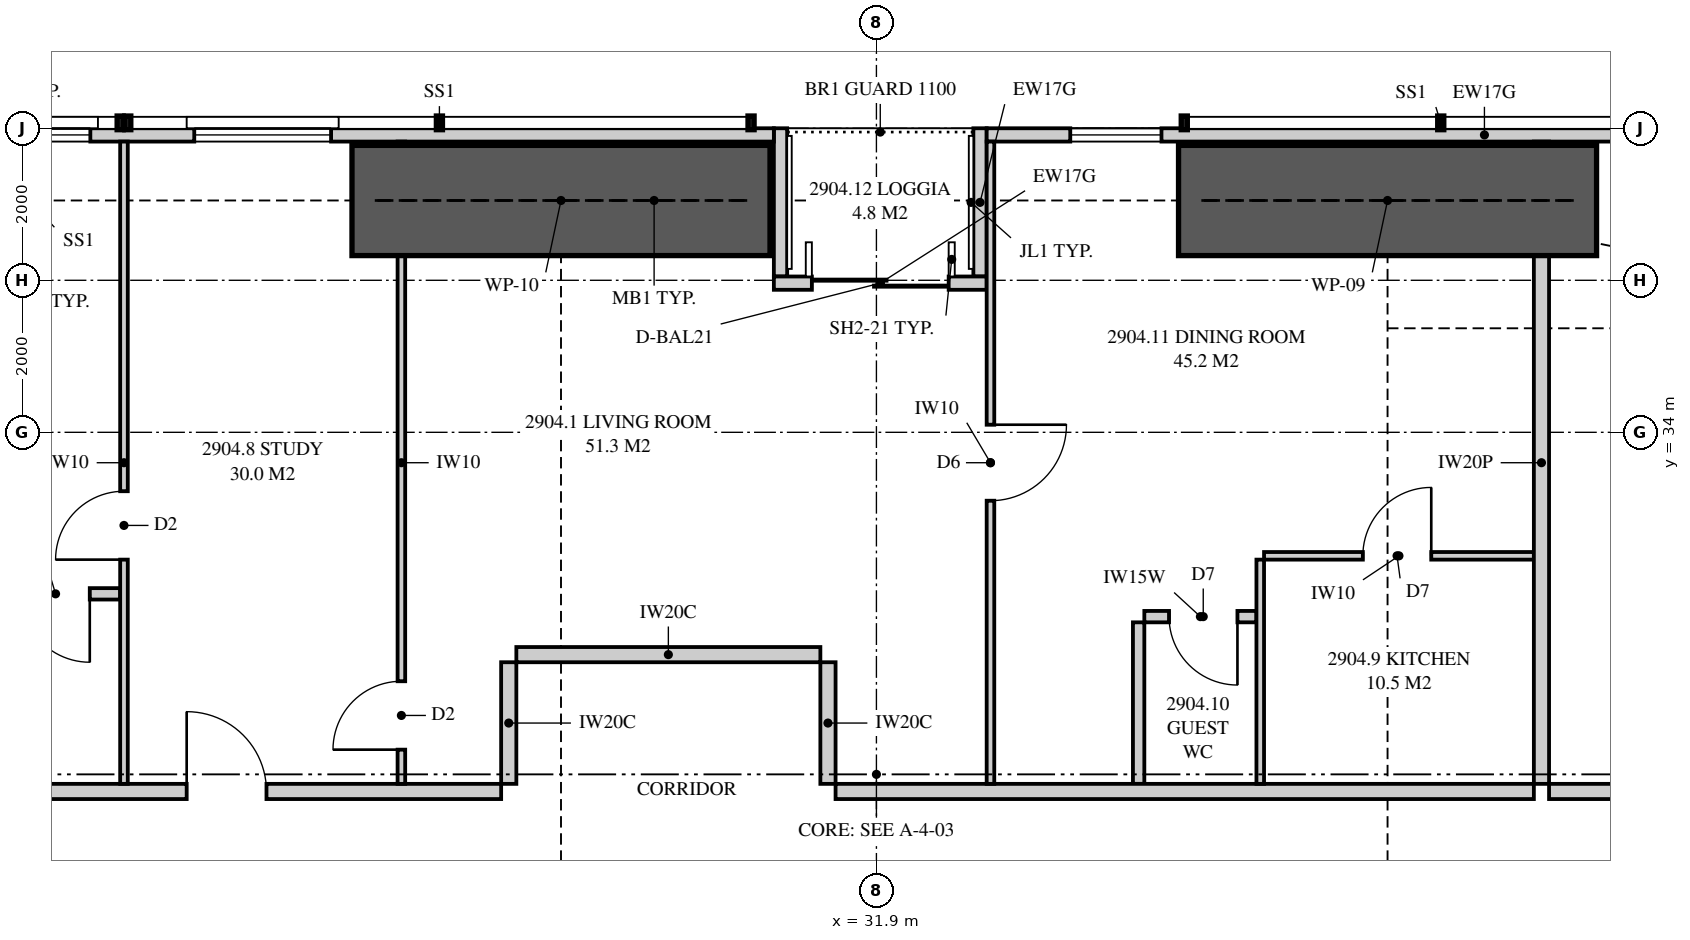
"""IFC4 building model, lengths in metres.
Left out: names, types, materials, properties, quantities, classifications, styles, units other than length and angle.
Written with IfcOpenShell. Run it as: python <this file> out.ifc"""

import sys

from ifc_helpers import new_model, si_unit, direction, frame, frame_2d, origin, place, context, subcontext, project, spatial, polyline, rectangle, outline, extrude, element, fill, save


model = new_model("IFC4")
c1 = context("Model", 3, precision=1e-05, world=origin(), true_north=direction((0.0, 1.0)))
c2 = subcontext(c1, "Body", "Model", "MODEL_VIEW")
j1 = project(units=[si_unit("LENGTHUNIT", "METRE"), si_unit("PLANEANGLEUNIT", "RADIAN")], contexts=[c1])
p1 = place(None, origin())
s1 = spatial("IfcSite", under=j1, at=p1, CompositionType="ELEMENT")
p2 = place(p1, origin())
s2 = spatial("IfcBuilding", under=s1, at=p2, CompositionType="ELEMENT")
p3 = place(p2, frame((0.0, 0.0, 108.2)))
s3 = spatial("IfcBuildingStorey", under=s2, at=p3, CompositionType="ELEMENT", Elevation=108.2)
p4 = place(p3, frame((46.449, 37.913, 0.0), z_axis=(0.0, 0.0, 1.0), x_axis=(-1.0, 0.0, 0.0)))
e1 = element("IfcWall", 1, at=p4, inside=s3, PredefinedType="SOLIDWALL", context=c2, shape_type="SweptSolid", body=[
    extrude(outline(polyline([(0.0, 0.0), (13.098, 0.0), (13.098, 2.15), (7.824, 2.15), (7.824, 3.11), (7.666, 3.11), (7.666, 2.15), (7.62, 2.15), (7.62, 3.11), (0.0, 3.11), (0.0, 0.0)])), frame((0.0, 0.087, 0.0), z_axis=(0.0, -1.0, 0.0), x_axis=(1.0, 0.0, 0.0)), (0.0, 0.0, 1.0), 0.175),
])
p5 = place(p4, frame((2.25, 0.0, 0.4)))
e2 = element("IfcOpeningElement", 2, at=p5, cuts=e1, PredefinedType="OPENING", context=c2, shape_type="SweptSolid", body=[
    extrude(rectangle(XDim=1.2, YDim=1.7, at=frame_2d((0.6, 0.85))), frame((0.0, 0.097, 0.0), z_axis=(0.0, -1.0, 0.0), x_axis=(1.0, 0.0, 0.0)), (0.0, 0.0, 1.0), 0.195),
])
p6 = place(p4, frame((10.798, 0.0, 0.4)))
e3 = element("IfcOpeningElement", 3, at=p6, cuts=e1, PredefinedType="OPENING", context=c2, shape_type="SweptSolid", body=[
    extrude(rectangle(XDim=1.2, YDim=1.7, at=frame_2d((0.6, 0.85))), frame((0.0, 0.097, 0.0), z_axis=(0.0, -1.0, 0.0), x_axis=(1.0, 0.0, 0.0)), (0.0, 0.0, 1.0), 0.195),
])
p7 = place(p3, frame((30.551, 37.913, 0.0), z_axis=(0.0, 0.0, 1.0), x_axis=(-1.0, 0.0, 0.0)))
e4 = element("IfcWall", 4, at=p7, inside=s3, PredefinedType="SOLIDWALL", context=c2, shape_type="SweptSolid", body=[
    extrude(outline(polyline([(0.0, 0.0), (21.499, 0.0), (21.499, 3.11), (13.879, 3.11), (13.879, 2.15), (13.834, 2.15), (13.834, 3.11), (13.676, 3.11), (13.676, 2.15), (0.0, 2.15), (0.0, 0.0)])), frame((0.0, 0.087, 0.0), z_axis=(0.0, -1.0, 0.0), x_axis=(1.0, 0.0, 0.0)), (0.0, 0.0, 1.0), 0.175),
])
p8 = place(p7, frame((5.826, 0.0, 0.4)))
e5 = element("IfcOpeningElement", 5, at=p8, cuts=e4, PredefinedType="OPENING", context=c2, shape_type="SweptSolid", body=[
    extrude(rectangle(XDim=1.8, YDim=1.7, at=frame_2d((0.9, 0.85))), frame((0.0, 0.097, 0.0), z_axis=(0.0, -1.0, 0.0), x_axis=(1.0, 0.0, 0.0)), (0.0, 0.0, 1.0), 0.195),
])
p9 = place(p7, frame((8.993, 0.0, 0.4)))
e6 = element("IfcOpeningElement", 6, at=p9, cuts=e4, PredefinedType="OPENING", context=c2, shape_type="SweptSolid", body=[
    extrude(rectangle(XDim=1.8, YDim=1.7, at=frame_2d((0.9, 0.85))), frame((0.0, 0.097, 0.0), z_axis=(0.0, -1.0, 0.0), x_axis=(1.0, 0.0, 0.0)), (0.0, 0.0, 1.0), 0.195),
])
p10 = place(p7, frame((16.566, 0.0, 0.4)))
e7 = element("IfcOpeningElement", 7, at=p10, cuts=e4, PredefinedType="OPENING", context=c2, shape_type="SweptSolid", body=[
    extrude(rectangle(XDim=1.8, YDim=1.7, at=frame_2d((0.9, 0.85))), frame((0.0, 0.097, 0.0), z_axis=(0.0, -1.0, 0.0), x_axis=(1.0, 0.0, 0.0)), (0.0, 0.0, 1.0), 0.195),
])
p11 = place(p3, frame((33.351, 35.962, 0.0), z_axis=(0.0, 0.0, 1.0), x_axis=(-1.0, 0.0, 0.0)))
e8 = element("IfcWall", 8, at=p11, inside=s3, PredefinedType="SOLIDWALL", context=c2, shape_type="SweptSolid", body=[
    extrude(rectangle(XDim=2.8, YDim=0.175, at=frame_2d((1.4, 0.0))), origin(), (0.0, 0.0, 1.0), 3.11),
])
p12 = place(p11, frame((0.5, 0.0, 0.0)))
e9 = element("IfcOpeningElement", 9, at=p12, cuts=e8, PredefinedType="OPENING", context=c2, shape_type="SweptSolid", body=[
    extrude(rectangle(XDim=1.8, YDim=2.1, at=frame_2d((0.9, 1.05))), frame((0.0, 0.097, 0.0), z_axis=(0.0, -1.0, 0.0), x_axis=(1.0, 0.0, 0.0)), (0.0, 0.0, 1.0), 0.195),
])
for number, where, z_axis, x_axis in (
    (10, (33.263, 38.0, 0.0), (0.0, 0.0, 1.0), (0.0, -1.0, 0.0)),
    (11, (30.638, 38.0, 0.0), (0.0, 0.0, 1.0), (0.0, -1.0, 0.0)),
):
    element("IfcWall", number, at=place(p3, frame(where, z_axis=z_axis, x_axis=x_axis)), inside=s3, PredefinedType="SOLIDWALL", context=c2, shape_type="SweptSolid", body=[
        extrude(outline(polyline([(0.0, 0.0), (1.95, 0.0), (1.95, 3.11), (1.75, 3.11), (1.75, 2.15), (0.15, 2.15), (0.15, 3.11), (0.0, 3.11), (0.0, 0.0)])), frame((0.0, 0.087, 0.0), z_axis=(0.0, -1.0, 0.0), x_axis=(1.0, 0.0, 0.0)), (0.0, 0.0, 1.0), 0.175),
    ])
p13 = place(p3, frame((40.65, 37.825, 0.0), z_axis=(0.0, 0.0, 1.0), x_axis=(0.0, -1.0, 0.0)))
e12 = element("IfcWall", 12, at=p13, inside=s3, PredefinedType="PARTITIONING", context=c2, shape_type="SweptSolid", body=[
    extrude(outline(polyline([(0.259, 3.11), (0.0, 3.11), (0.0, 0.0), (0.529, 0.0), (0.529, 0.12), (1.021, 0.12), (1.021, 0.0), (8.45, 0.0), (8.45, 3.11), (3.766, 3.11), (3.766, 2.51), (2.117, 2.51), (2.117, 2.15), (1.021, 2.15), (1.021, 2.03), (0.529, 2.03), (0.529, 2.15), (0.259, 2.15), (0.259, 3.11)])), frame((0.0, 0.1, 0.0), z_axis=(0.0, -1.0, 0.0), x_axis=(1.0, 0.0, 0.0)), (0.0, 0.0, 1.0), 0.2),
])
p14 = place(p3, frame((17.775, 29.275, 0.0), z_axis=(0.0, 0.0, 1.0), x_axis=(1.0, 0.0, 0.0)))
e13 = element("IfcWall", 13, at=p14, inside=s3, PredefinedType="PARTITIONING", context=c2, shape_type="SweptSolid", body=[
    extrude(rectangle(XDim=9.188, YDim=0.2, at=frame_2d((4.594, 0.0))), origin(), (0.0, 0.0, 1.0), 3.11),
])
p15 = place(p14, frame((5.05, 0.0, 0.0)))
e14 = element("IfcOpeningElement", 14, at=p15, cuts=e13, PredefinedType="OPENING", context=c2, shape_type="SweptSolid", body=[
    extrude(rectangle(XDim=1.05, YDim=2.2, at=frame_2d((0.525, 1.1))), frame((0.0, 0.11, 0.0), z_axis=(0.0, -1.0, 0.0), x_axis=(1.0, 0.0, 0.0)), (0.0, 0.0, 1.0), 0.22),
])
p16 = place(p3, frame((22.0, 37.825, 0.0), z_axis=(0.0, 0.0, 1.0), x_axis=(0.0, -1.0, 0.0)))
e15 = element("IfcWall", 15, at=p16, inside=s3, PredefinedType="PARTITIONING", context=c2, shape_type="SweptSolid", body=[
    extrude(outline(polyline([(0.0, 0.0), (8.45, 0.0), (8.45, 3.11), (1.635, 3.11), (1.635, 2.15), (0.0, 2.15), (0.0, 3.11), (0.0, 0.0)])), frame((0.0, 0.05, 0.0), z_axis=(0.0, -1.0, 0.0), x_axis=(1.0, 0.0, 0.0)), (0.0, 0.0, 1.0), 0.1),
])
p17 = place(p16, frame((4.6, 0.0, 0.0)))
e16 = element("IfcOpeningElement", 16, at=p17, cuts=e15, PredefinedType="OPENING", context=c2, shape_type="SweptSolid", body=[
    extrude(rectangle(XDim=0.9, YDim=2.1, at=frame_2d((0.45, 1.05))), frame((0.0, 0.06, 0.0), z_axis=(0.0, -1.0, 0.0), x_axis=(1.0, 0.0, 0.0)), (0.0, 0.0, 1.0), 0.12),
])
p18 = place(p3, frame((17.75, 31.875, 0.0), z_axis=(0.0, 0.0, 1.0), x_axis=(1.0, 0.0, 0.0)))
e17 = element("IfcWall", 17, at=p18, inside=s3, PredefinedType="PLUMBINGWALL", context=c2, shape_type="SweptSolid", body=[
    extrude(rectangle(XDim=4.2, YDim=0.15, at=frame_2d((2.1, 0.0))), origin(), (0.0, 0.0, 1.0), 3.11),
])
p19 = place(p18, frame((2.9, 0.0, 0.0)))
e18 = element("IfcOpeningElement", 18, at=p19, cuts=e17, PredefinedType="OPENING", context=c2, shape_type="SweptSolid", body=[
    extrude(rectangle(XDim=0.9, YDim=2.1, at=frame_2d((0.45, 1.05))), frame((0.0, 0.085, 0.0), z_axis=(0.0, -1.0, 0.0), x_axis=(1.0, 0.0, 0.0)), (0.0, 0.0, 1.0), 0.17),
])
p20 = place(p3, frame((25.65, 37.825, 0.0), z_axis=(0.0, 0.0, 1.0), x_axis=(0.0, -1.0, 0.0)))
e19 = element("IfcWall", 19, at=p20, inside=s3, PredefinedType="PARTITIONING", context=c2, shape_type="SweptSolid", body=[
    extrude(outline(polyline([(0.529, 2.15), (0.0, 2.15), (0.0, 0.0), (0.529, 0.0), (0.529, 0.034), (1.021, 0.034), (1.021, 0.0), (8.45, 0.0), (8.45, 3.11), (1.635, 3.11), (1.635, 2.15), (1.021, 2.15), (1.021, 2.116), (0.529, 2.116), (0.529, 2.15)])), frame((0.0, 0.05, 0.0), z_axis=(0.0, -1.0, 0.0), x_axis=(1.0, 0.0, 0.0)), (0.0, 0.0, 1.0), 0.1),
])
p21 = place(p20, frame((7.1, 0.0, 0.0)))
e20 = element("IfcOpeningElement", 20, at=p21, cuts=e19, PredefinedType="OPENING", context=c2, shape_type="SweptSolid", body=[
    extrude(rectangle(XDim=0.9, YDim=2.1, at=frame_2d((0.45, 1.05))), frame((0.0, 0.06, 0.0), z_axis=(0.0, -1.0, 0.0), x_axis=(1.0, 0.0, 0.0)), (0.0, 0.0, 1.0), 0.12),
])
p22 = place(p3, frame((37.0, 32.375, 0.0), z_axis=(0.0, 0.0, 1.0), x_axis=(1.0, 0.0, 0.0)))
e21 = element("IfcWall", 21, at=p22, inside=s3, PredefinedType="PARTITIONING", context=c2, shape_type="SweptSolid", body=[
    extrude(outline(polyline([(0.0, 0.0), (3.55, 0.0), (3.55, 3.11), (1.912, 3.11), (1.912, 2.541), (1.338, 2.541), (1.338, 3.11), (0.0, 3.11), (0.0, 0.0)])), frame((0.0, 0.05, 0.0), z_axis=(0.0, -1.0, 0.0), x_axis=(1.0, 0.0, 0.0)), (0.0, 0.0, 1.0), 0.1),
])
p23 = place(p22, frame((1.3, 0.0, 0.0)))
e22 = element("IfcOpeningElement", 22, at=p23, cuts=e21, PredefinedType="OPENING", context=c2, shape_type="SweptSolid", body=[
    extrude(rectangle(XDim=0.9, YDim=2.1, at=frame_2d((0.45, 1.05))), frame((0.0, 0.06, 0.0), z_axis=(0.0, -1.0, 0.0), x_axis=(1.0, 0.0, 0.0)), (0.0, 0.0, 1.0), 0.12),
])
p24 = place(p3, frame((36.95, 32.325, 0.0), z_axis=(0.0, 0.0, 1.0), x_axis=(0.0, -1.0, 0.0)))
e23 = element("IfcWall", 23, at=p24, inside=s3, PredefinedType="PARTITIONING", context=c2, shape_type="SweptSolid", body=[
    extrude(rectangle(XDim=2.95, YDim=0.1, at=frame_2d((1.475, 0.0))), origin(), (0.0, 0.0, 1.0), 3.11),
])
p25 = place(p3, frame((35.425, 31.575, 0.0), z_axis=(0.0, 0.0, 1.0), x_axis=(1.0, 0.0, 0.0)))
e24 = element("IfcWall", 24, at=p25, inside=s3, PredefinedType="PLUMBINGWALL", context=c2, shape_type="SweptSolid", body=[
    extrude(rectangle(XDim=1.475, YDim=0.15, at=frame_2d((0.737, 0.0))), origin(), (0.0, 0.0, 1.0), 3.11),
])
p26 = place(p25, frame((0.325, 0.0, 0.0)))
e25 = element("IfcOpeningElement", 25, at=p26, cuts=e24, PredefinedType="OPENING", context=c2, shape_type="SweptSolid", body=[
    extrude(rectangle(XDim=0.9, YDim=2.1, at=frame_2d((0.45, 1.05))), frame((0.0, 0.085, 0.0), z_axis=(0.0, -1.0, 0.0), x_axis=(1.0, 0.0, 0.0)), (0.0, 0.0, 1.0), 0.17),
])
p27 = place(p3, frame((35.35, 31.5, 0.0), z_axis=(0.0, 0.0, 1.0), x_axis=(0.0, -1.0, 0.0)))
e26 = element("IfcWall", 26, at=p27, inside=s3, PredefinedType="PLUMBINGWALL", context=c2, shape_type="SweptSolid", body=[
    extrude(rectangle(XDim=2.125, YDim=0.15, at=frame_2d((1.062, 0.0))), origin(), (0.0, 0.0, 1.0), 3.11),
])
p28 = place(p3, frame((33.401, 37.825, 0.0), z_axis=(0.0, 0.0, 1.0), x_axis=(0.0, -1.0, 0.0)))
e27 = element("IfcWall", 27, at=p28, inside=s3, PredefinedType="PARTITIONING", context=c2, shape_type="SweptSolid", body=[
    extrude(outline(polyline([(0.0, 0.0), (8.45, 0.0), (8.45, 3.11), (1.635, 3.11), (1.635, 2.15), (0.0, 2.15), (0.0, 3.11), (0.0, 0.0)])), frame((0.0, 0.05, 0.0), z_axis=(0.0, -1.0, 0.0), x_axis=(1.0, 0.0, 0.0)), (0.0, 0.0, 1.0), 0.1),
])
p29 = place(p28, frame((3.725, 0.0, 0.0)))
e28 = element("IfcOpeningElement", 28, at=p29, cuts=e27, PredefinedType="OPENING", context=c2, shape_type="SweptSolid", body=[
    extrude(rectangle(XDim=1.0, YDim=2.1, at=frame_2d((0.5, 1.05))), frame((0.0, 0.06, 0.0), z_axis=(0.0, -1.0, 0.0), x_axis=(1.0, 0.0, 0.0)), (0.0, 0.0, 1.0), 0.12),
])
p30 = place(p3, frame((40.75, 29.275, 0.0), z_axis=(0.0, 0.0, 1.0), x_axis=(1.0, 0.0, 0.0)))
e29 = element("IfcWall", 29, at=p30, inside=s3, PredefinedType="PARTITIONING", context=c2, shape_type="SweptSolid", body=[
    extrude(rectangle(XDim=5.275, YDim=0.2, at=frame_2d((2.637, 0.0))), origin(), (0.0, 0.0, 1.0), 3.11),
])
p31 = place(p30, frame((1.738, 0.0, 0.0)))
e30 = element("IfcOpeningElement", 30, at=p31, cuts=e29, PredefinedType="OPENING", context=c2, shape_type="SweptSolid", body=[
    extrude(rectangle(XDim=1.8, YDim=2.1, at=frame_2d((0.9, 1.05))), frame((0.0, 0.11, 0.0), z_axis=(0.0, -1.0, 0.0), x_axis=(1.0, 0.0, 0.0)), (0.0, 0.0, 1.0), 0.22),
])
p32 = place(p3, frame((31.363, 29.275, 0.0), z_axis=(0.0, 0.0, 1.0), x_axis=(1.0, 0.0, 0.0)))
e31 = element("IfcWall", 31, at=p32, inside=s3, PredefinedType="PARTITIONING", context=c2, shape_type="SweptSolid", body=[
    extrude(outline(polyline([(0.0, 0.0), (9.188, 0.0), (9.188, 3.11), (7.6, 3.11), (7.6, 2.541), (6.925, 2.541), (6.925, 3.11), (0.0, 3.11), (0.0, 0.0)])), frame((0.0, 0.1, 0.0), z_axis=(0.0, -1.0, 0.0), x_axis=(1.0, 0.0, 0.0)), (0.0, 0.0, 1.0), 0.2),
])
p33 = place(p3, frame((27.163, 31.075, 0.0), z_axis=(0.0, 0.0, 1.0), x_axis=(1.0, 0.0, 0.0)))
e32 = element("IfcWall", 32, at=p33, inside=s3, PredefinedType="PARTITIONING", context=c2, shape_type="SweptSolid", body=[
    extrude(outline(polyline([(0.0, 0.0), (4.0, 0.0), (4.0, 3.11), (0.925, 3.11), (0.925, 2.541), (0.25, 2.541), (0.25, 3.11), (0.0, 3.11), (0.0, 0.0)])), frame((0.0, 0.1, 0.0), z_axis=(0.0, -1.0, 0.0), x_axis=(1.0, 0.0, 0.0)), (0.0, 0.0, 1.0), 0.2),
])
for number, where, z_axis, x_axis in (
    (33, (27.062, 29.375, 0.0), (0.0, 0.0, 1.0), (0.0, 1.0, 0.0)),
    (34, (31.262, 29.375, 0.0), (0.0, 0.0, 1.0), (0.0, 1.0, 0.0)),
):
    element("IfcWall", number, at=place(p3, frame(where, z_axis=z_axis, x_axis=x_axis)), inside=s3, PredefinedType="PARTITIONING", context=c2, shape_type="SweptSolid", body=[
        extrude(rectangle(XDim=1.6, YDim=0.2, at=frame_2d((0.8, 0.0))), origin(), (0.0, 0.0, 1.0), 3.11),
    ])
for number, where, z_axis, x_axis in (
    (35, (35.875, 37.05, 0.0), (0.0, 0.0, 1.0), (1.0, 0.0, 0.0)),
    (36, (25.0, 37.05, 0.0), (0.0, 0.0, 1.0), (1.0, 0.0, 0.0)),
):
    element("IfcWall", number, at=place(p3, frame(where, z_axis=z_axis, x_axis=x_axis)), inside=s3, PredefinedType="SHEAR", context=c2, shape_type="SweptSolid", body=[
        extrude(rectangle(XDim=5.5, YDim=1.45, at=frame_2d((2.75, 0.0))), origin(), (0.0, 0.0, 1.0), 3.35),
    ])
p34 = place(p6, origin())
e37 = element("IfcWindow", 37, at=p34, inside=s3, PartitioningType="SINGLE_PANEL", PredefinedType="WINDOW", context=c2, shape_type="SweptSolid", body=[
    extrude(rectangle(XDim=1.2, YDim=1.7, at=frame_2d((0.6, 0.85))), frame((0.0, 0.03, 0.0), z_axis=(0.0, -1.0, 0.0), x_axis=(1.0, 0.0, 0.0)), (0.0, 0.0, 1.0), 0.06),
])
fill(e3, e37)
p35 = place(p12, origin())
e38 = element("IfcDoor", 38, at=p35, inside=s3, OperationType="SLIDING_TO_LEFT", PredefinedType="DOOR", context=c2, shape_type="SweptSolid", body=[
    extrude(rectangle(XDim=1.8, YDim=2.1, at=frame_2d((0.9, 1.05))), frame((0.0, 0.025, 0.0), z_axis=(0.0, -1.0, 0.0), x_axis=(1.0, 0.0, 0.0)), (0.0, 0.0, 1.0), 0.05),
])
fill(e9, e38)
p36 = place(p8, origin())
e39 = element("IfcWindow", 39, at=p36, inside=s3, PartitioningType="SINGLE_PANEL", PredefinedType="WINDOW", context=c2, shape_type="SweptSolid", body=[
    extrude(rectangle(XDim=1.8, YDim=1.7, at=frame_2d((0.9, 0.85))), frame((0.0, 0.03, 0.0), z_axis=(0.0, -1.0, 0.0), x_axis=(1.0, 0.0, 0.0)), (0.0, 0.0, 1.0), 0.06),
])
fill(e5, e39)
p37 = place(p9, origin())
e40 = element("IfcWindow", 40, at=p37, inside=s3, PartitioningType="SINGLE_PANEL", PredefinedType="WINDOW", context=c2, shape_type="SweptSolid", body=[
    extrude(rectangle(XDim=1.8, YDim=1.7, at=frame_2d((0.9, 0.85))), frame((0.0, 0.03, 0.0), z_axis=(0.0, -1.0, 0.0), x_axis=(1.0, 0.0, 0.0)), (0.0, 0.0, 1.0), 0.06),
])
fill(e6, e40)
p38 = place(p15, origin())
e41 = element("IfcDoor", 41, at=p38, inside=s3, OperationType="SINGLE_SWING_LEFT", PredefinedType="DOOR", context=c2, shape_type="SweptSolid", body=[
    extrude(rectangle(XDim=1.05, YDim=2.2, at=frame_2d((0.525, 1.1))), frame((0.0, 0.025, 0.0), z_axis=(0.0, -1.0, 0.0), x_axis=(1.0, 0.0, 0.0)), (0.0, 0.0, 1.0), 0.05),
])
fill(e14, e41)
p39 = place(p17, frame((0.9, 0.0, 0.0), z_axis=(0.0, 0.0, 1.0), x_axis=(-1.0, 0.0, 0.0)))
e42 = element("IfcDoor", 42, at=p39, inside=s3, OperationType="SINGLE_SWING_LEFT", PredefinedType="DOOR", context=c2, shape_type="SweptSolid", body=[
    extrude(rectangle(XDim=0.9, YDim=2.1, at=frame_2d((0.45, 1.05))), frame((0.0, 0.025, 0.0), z_axis=(0.0, -1.0, 0.0), x_axis=(1.0, 0.0, 0.0)), (0.0, 0.0, 1.0), 0.05),
])
fill(e16, e42)
p40 = place(p19, frame((0.9, 0.0, 0.0), z_axis=(0.0, 0.0, 1.0), x_axis=(-1.0, 0.0, 0.0)))
e43 = element("IfcDoor", 43, at=p40, inside=s3, OperationType="SINGLE_SWING_LEFT", PredefinedType="DOOR", context=c2, shape_type="SweptSolid", body=[
    extrude(rectangle(XDim=0.9, YDim=2.1, at=frame_2d((0.45, 1.05))), frame((0.0, 0.025, 0.0), z_axis=(0.0, -1.0, 0.0), x_axis=(1.0, 0.0, 0.0)), (0.0, 0.0, 1.0), 0.05),
])
fill(e18, e43)
p41 = place(p21, frame((0.9, 0.0, 0.0), z_axis=(0.0, 0.0, 1.0), x_axis=(-1.0, 0.0, 0.0)))
e44 = element("IfcDoor", 44, at=p41, inside=s3, OperationType="SINGLE_SWING_LEFT", PredefinedType="DOOR", context=c2, shape_type="SweptSolid", body=[
    extrude(rectangle(XDim=0.9, YDim=2.1, at=frame_2d((0.45, 1.05))), frame((0.0, 0.025, 0.0), z_axis=(0.0, -1.0, 0.0), x_axis=(1.0, 0.0, 0.0)), (0.0, 0.0, 1.0), 0.05),
])
fill(e20, e44)
p42 = place(p23, origin())
e45 = element("IfcDoor", 45, at=p42, inside=s3, OperationType="SINGLE_SWING_RIGHT", PredefinedType="DOOR", context=c2, shape_type="SweptSolid", body=[
    extrude(rectangle(XDim=0.9, YDim=2.1, at=frame_2d((0.45, 1.05))), frame((0.0, 0.025, 0.0), z_axis=(0.0, -1.0, 0.0), x_axis=(1.0, 0.0, 0.0)), (0.0, 0.0, 1.0), 0.05),
])
fill(e22, e45)
p43 = place(p26, frame((0.9, 0.0, 0.0), z_axis=(0.0, 0.0, 1.0), x_axis=(-1.0, 0.0, 0.0)))
e46 = element("IfcDoor", 46, at=p43, inside=s3, OperationType="SINGLE_SWING_LEFT", PredefinedType="DOOR", context=c2, shape_type="SweptSolid", body=[
    extrude(rectangle(XDim=0.9, YDim=2.1, at=frame_2d((0.45, 1.05))), frame((0.0, 0.025, 0.0), z_axis=(0.0, -1.0, 0.0), x_axis=(1.0, 0.0, 0.0)), (0.0, 0.0, 1.0), 0.05),
])
fill(e25, e46)
p44 = place(p29, origin())
e47 = element("IfcDoor", 47, at=p44, inside=s3, OperationType="SINGLE_SWING_LEFT", PredefinedType="DOOR", context=c2, shape_type="SweptSolid", body=[
    extrude(rectangle(XDim=1.0, YDim=2.1, at=frame_2d((0.5, 1.05))), frame((0.0, 0.025, 0.0), z_axis=(0.0, -1.0, 0.0), x_axis=(1.0, 0.0, 0.0)), (0.0, 0.0, 1.0), 0.05),
])
fill(e28, e47)
save(model, sys.argv[1])
